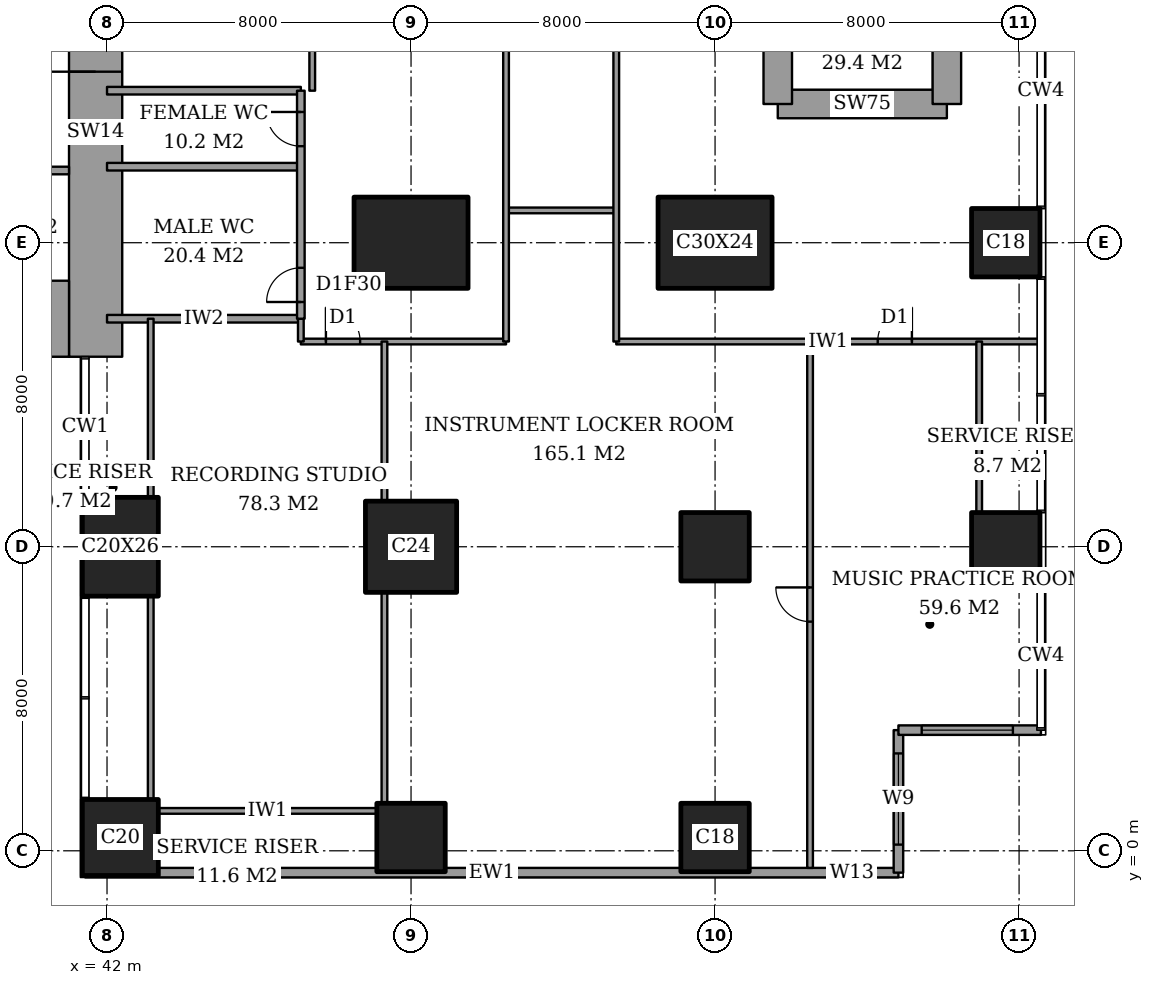
"""IFC4 building model, lengths in metres.
Left out: names, types, materials, properties, quantities, classifications, styles, units other than length and angle.
Written with IfcOpenShell. Run it as: python <this file> out.ifc"""

import sys

from ifc_helpers import new_model, si_unit, direction, frame, frame_2d, origin, origin_2d, place, context, subcontext, project, spatial, rectangle, extrude, element, fill, save


model = new_model("IFC4")
c1 = context("Model", 3, precision=1e-05, world=origin(), true_north=direction((0.0, 1.0)))
c2 = subcontext(c1, "Body", "Model", "MODEL_VIEW")
j1 = project(units=[si_unit("LENGTHUNIT", "METRE"), si_unit("PLANEANGLEUNIT", "RADIAN")], contexts=[c1])
p1 = place(None, origin())
s1 = spatial("IfcSite", under=j1, at=p1, CompositionType="ELEMENT")
p2 = place(p1, origin())
s2 = spatial("IfcBuilding", under=s1, at=p2, CompositionType="ELEMENT")
p3 = place(p2, frame((0.0, 0.0, 200.2)))
s3 = spatial("IfcBuildingStorey", under=s2, at=p3, CompositionType="ELEMENT", Elevation=200.2)
p4 = place(p3, frame((42.35, 0.35, 0.0), z_axis=(0.0, 0.0, 1.0), x_axis=(1.0, 0.0, 0.0)))
e1 = element("IfcColumn", 1, at=p4, inside=s3, PredefinedType="COLUMN", context=c2, shape_type="SweptSolid", body=[
    extrude(rectangle(XDim=2.0, YDim=2.0, at=origin_2d()), origin(), (0.0, 0.0, 1.0), 3.6),
])
p5 = place(p3, frame((42.35, 8.0, 0.0), z_axis=(0.0, 0.0, 1.0), x_axis=(1.0, 0.0, 0.0)))
e2 = element("IfcColumn", 2, at=p5, inside=s3, PredefinedType="COLUMN", context=c2, shape_type="SweptSolid", body=[
    extrude(rectangle(XDim=2.0, YDim=2.6, at=origin_2d()), origin(), (0.0, 0.0, 1.0), 3.6),
])
p6 = place(p3, frame((50.0, 0.35, 0.0), z_axis=(0.0, 0.0, 1.0), x_axis=(1.0, 0.0, 0.0)))
e3 = element("IfcColumn", 3, at=p6, inside=s3, PredefinedType="COLUMN", context=c2, shape_type="SweptSolid", body=[
    extrude(rectangle(XDim=1.8, YDim=1.8, at=origin_2d()), origin(), (0.0, 0.0, 1.0), 3.6),
])
p7 = place(p3, frame((50.0, 8.0, 0.0), z_axis=(0.0, 0.0, 1.0), x_axis=(1.0, 0.0, 0.0)))
e4 = element("IfcColumn", 4, at=p7, inside=s3, PredefinedType="COLUMN", context=c2, shape_type="SweptSolid", body=[
    extrude(rectangle(XDim=2.4, YDim=2.4, at=origin_2d()), origin(), (0.0, 0.0, 1.0), 3.6),
])
p8 = place(p3, frame((50.0, 16.0, 0.0), z_axis=(0.0, 0.0, 1.0), x_axis=(1.0, 0.0, 0.0)))
e5 = element("IfcColumn", 5, at=p8, inside=s3, PredefinedType="COLUMN", context=c2, shape_type="SweptSolid", body=[
    extrude(rectangle(XDim=3.0, YDim=2.4, at=origin_2d()), origin(), (0.0, 0.0, 1.0), 3.6),
])
for number, where, z_axis, x_axis in (
    (6, (58.0, 0.35, 0.0), (0.0, 0.0, 1.0), (1.0, 0.0, 0.0)),
    (7, (58.0, 8.0, 0.0), (0.0, 0.0, 1.0), (1.0, 0.0, 0.0)),
):
    element("IfcColumn", number, at=place(p3, frame(where, z_axis=z_axis, x_axis=x_axis)), inside=s3, PredefinedType="COLUMN", context=c2, shape_type="SweptSolid", body=[
        extrude(rectangle(XDim=1.8, YDim=1.8, at=origin_2d()), origin(), (0.0, 0.0, 1.0), 3.6),
    ])
p9 = place(p3, frame((58.0, 16.0, 0.0), z_axis=(0.0, 0.0, 1.0), x_axis=(1.0, 0.0, 0.0)))
e8 = element("IfcColumn", 8, at=p9, inside=s3, PredefinedType="COLUMN", context=c2, shape_type="SweptSolid", body=[
    extrude(rectangle(XDim=3.0, YDim=2.4, at=origin_2d()), origin(), (0.0, 0.0, 1.0), 3.6),
])
for number, where, z_axis, x_axis in (
    (9, (65.65, 8.0, 0.0), (0.0, 0.0, 1.0), (1.0, 0.0, 0.0)),
    (10, (65.65, 16.0, 0.0), (0.0, 0.0, 1.0), (1.0, 0.0, 0.0)),
):
    element("IfcColumn", number, at=place(p3, frame(where, z_axis=z_axis, x_axis=x_axis)), inside=s3, PredefinedType="COLUMN", context=c2, shape_type="SweptSolid", body=[
        extrude(rectangle(XDim=1.8, YDim=1.8, at=origin_2d()), origin(), (0.0, 0.0, 1.0), 3.6),
    ])
p10 = place(p3, frame((37.85, 14.0, 0.0), z_axis=(0.0, 0.0, 1.0), x_axis=(1.0, 0.0, 0.0)))
e11 = element("IfcWall", 11, at=p10, inside=s3, PredefinedType="SHEAR", context=c2, shape_type="SweptSolid", body=[
    extrude(rectangle(XDim=3.15, YDim=2.0, at=frame_2d((1.575, 0.0))), origin(), (0.0, 0.0, 1.0), 3.6),
])
p11 = place(p3, frame((41.7, 13.0, 0.0), z_axis=(0.0, 0.0, 1.0), x_axis=(0.0, 1.0, 0.0)))
e12 = element("IfcWall", 12, at=p11, inside=s3, PredefinedType="SHEAR", context=c2, shape_type="SweptSolid", body=[
    extrude(rectangle(XDim=11.85, YDim=1.4, at=frame_2d((5.925, 0.0))), origin(), (0.0, 0.0, 1.0), 3.6),
])
p12 = place(p11, frame((7.5, 0.0, 0.0)))
e13 = element("IfcOpeningElement", 13, at=p12, cuts=e12, PredefinedType="OPENING", context=c2, shape_type="SweptSolid", body=[
    extrude(rectangle(XDim=1.8, YDim=2.4, at=frame_2d((0.9, 1.2))), frame((0.0, 0.71, 0.0), z_axis=(0.0, -1.0, 0.0), x_axis=(1.0, 0.0, 0.0)), (0.0, 0.0, 1.0), 1.42),
])
p13 = place(p3, frame((59.65, 19.65, 0.0), z_axis=(0.0, 0.0, 1.0), x_axis=(1.0, 0.0, 0.0)))
e14 = element("IfcWall", 14, at=p13, inside=s3, PredefinedType="SHEAR", context=c2, shape_type="SweptSolid", body=[
    extrude(rectangle(XDim=4.45, YDim=0.75, at=frame_2d((2.225, 0.0))), origin(), (0.0, 0.0, 1.0), 3.6),
])
for number, where, z_axis, x_axis in (
    (15, (64.1, 19.65, 0.0), (0.0, 0.0, 1.0), (0.0, 1.0, 0.0)),
    (16, (59.65, 28.35, 0.0), (0.0, 0.0, 1.0), (0.0, -1.0, 0.0)),
):
    element("IfcWall", number, at=place(p3, frame(where, z_axis=z_axis, x_axis=x_axis)), inside=s3, PredefinedType="SHEAR", context=c2, shape_type="SweptSolid", body=[
        extrude(rectangle(XDim=8.7, YDim=0.75, at=frame_2d((4.35, 0.0))), origin(), (0.0, 0.0, 1.0), 3.6),
    ])
p14 = place(p3, frame((41.425, -0.575, 0.0), z_axis=(0.0, 0.0, 1.0), x_axis=(1.0, 0.0, 0.0)))
e17 = element("IfcWall", 17, at=p14, inside=s3, PredefinedType="SOLIDWALL", context=c2, shape_type="SweptSolid", body=[
    extrude(rectangle(XDim=21.4, YDim=0.25, at=frame_2d((10.7, 0.0))), origin(), (0.0, 0.0, 1.0), 3.6),
])
p15 = place(p14, frame((19.575, 0.0, 0.2)))
e18 = element("IfcOpeningElement", 18, at=p15, cuts=e17, PredefinedType="OPENING", context=c2, shape_type="SweptSolid", body=[
    extrude(rectangle(XDim=1.2, YDim=2.4, at=frame_2d((0.6, 1.2))), frame((0.0, 0.135, 0.0), z_axis=(0.0, -1.0, 0.0), x_axis=(1.0, 0.0, 0.0)), (0.0, 0.0, 1.0), 0.27),
])
p16 = place(p3, frame((62.825, -0.575, 0.0), z_axis=(0.0, 0.0, 1.0), x_axis=(0.0, 1.0, 0.0)))
e19 = element("IfcWall", 19, at=p16, inside=s3, PredefinedType="SOLIDWALL", context=c2, shape_type="SweptSolid", body=[
    extrude(rectangle(XDim=3.75, YDim=0.25, at=frame_2d((1.875, 0.0))), origin(), (0.0, 0.0, 1.0), 3.6),
])
p17 = place(p16, frame((0.738, 0.0, 0.2)))
e20 = element("IfcOpeningElement", 20, at=p17, cuts=e19, PredefinedType="OPENING", context=c2, shape_type="SweptSolid", body=[
    extrude(rectangle(XDim=2.4, YDim=2.4, at=frame_2d((1.2, 1.2))), frame((0.0, 0.135, 0.0), z_axis=(0.0, -1.0, 0.0), x_axis=(1.0, 0.0, 0.0)), (0.0, 0.0, 1.0), 0.27),
])
p18 = place(p3, frame((62.825, 3.175, 0.0), z_axis=(0.0, 0.0, 1.0), x_axis=(1.0, 0.0, 0.0)))
e21 = element("IfcWall", 21, at=p18, inside=s3, PredefinedType="SOLIDWALL", context=c2, shape_type="SweptSolid", body=[
    extrude(rectangle(XDim=3.75, YDim=0.25, at=frame_2d((1.875, 0.0))), origin(), (0.0, 0.0, 1.0), 3.6),
])
p19 = place(p18, frame((0.613, 0.0, 0.2)))
e22 = element("IfcOpeningElement", 22, at=p19, cuts=e21, PredefinedType="OPENING", context=c2, shape_type="SweptSolid", body=[
    extrude(rectangle(XDim=2.4, YDim=2.4, at=frame_2d((1.2, 1.2))), frame((0.0, 0.135, 0.0), z_axis=(0.0, -1.0, 0.0), x_axis=(1.0, 0.0, 0.0)), (0.0, 0.0, 1.0), 0.27),
])
p20 = place(p3, frame((43.35, 1.05, 0.0), z_axis=(0.0, 0.0, 1.0), x_axis=(1.0, 0.0, 0.0)))
e23 = element("IfcWall", 23, at=p20, inside=s3, PredefinedType="PARTITIONING", context=c2, shape_type="SweptSolid", body=[
    extrude(rectangle(XDim=5.75, YDim=0.15, at=frame_2d((2.875, 0.0))), origin(), (0.0, 0.0, 1.0), 3.35),
])
p21 = place(p3, frame((47.1, 13.4, 0.0), z_axis=(0.0, 0.0, 1.0), x_axis=(1.0, 0.0, 0.0)))
e24 = element("IfcWall", 24, at=p21, inside=s3, PredefinedType="PARTITIONING", context=c2, shape_type="SweptSolid", body=[
    extrude(rectangle(XDim=5.4, YDim=0.15, at=frame_2d((2.7, 0.0))), origin(), (0.0, 0.0, 1.0), 3.35),
])
p22 = place(p21, frame((0.66, 0.0, 0.0)))
e25 = element("IfcOpeningElement", 25, at=p22, cuts=e24, PredefinedType="OPENING", context=c2, shape_type="SweptSolid", body=[
    extrude(rectangle(XDim=0.9, YDim=2.1, at=frame_2d((0.45, 1.05))), frame((0.0, 0.085, 0.0), z_axis=(0.0, -1.0, 0.0), x_axis=(1.0, 0.0, 0.0)), (0.0, 0.0, 1.0), 0.17),
])
p23 = place(p3, frame((55.4, 13.4, 0.0), z_axis=(0.0, 0.0, 1.0), x_axis=(1.0, 0.0, 0.0)))
e26 = element("IfcWall", 26, at=p23, inside=s3, PredefinedType="PARTITIONING", context=c2, shape_type="SweptSolid", body=[
    extrude(rectangle(XDim=11.161, YDim=0.15, at=frame_2d((5.581, 0.0))), origin(), (0.0, 0.0, 1.0), 3.35),
])
p24 = place(p23, frame((6.88, 0.0, 0.0)))
e27 = element("IfcOpeningElement", 27, at=p24, cuts=e26, PredefinedType="OPENING", context=c2, shape_type="SweptSolid", body=[
    extrude(rectangle(XDim=0.9, YDim=2.1, at=frame_2d((0.45, 1.05))), frame((0.0, 0.085, 0.0), z_axis=(0.0, -1.0, 0.0), x_axis=(1.0, 0.0, 0.0)), (0.0, 0.0, 1.0), 0.17),
])
p25 = place(p3, frame((42.0, 14.0, 0.0), z_axis=(0.0, 0.0, 1.0), x_axis=(1.0, 0.0, 0.0)))
e28 = element("IfcWall", 28, at=p25, inside=s3, PredefinedType="PARTITIONING", context=c2, shape_type="SweptSolid", body=[
    extrude(rectangle(XDim=5.1, YDim=0.2, at=frame_2d((2.55, 0.0))), origin(), (0.0, 0.0, 1.0), 3.35),
])
p26 = place(p3, frame((52.5, 16.85, 0.0), z_axis=(0.0, 0.0, 1.0), x_axis=(1.0, 0.0, 0.0)))
e29 = element("IfcWall", 29, at=p26, inside=s3, PredefinedType="PARTITIONING", context=c2, shape_type="SweptSolid", body=[
    extrude(rectangle(XDim=2.9, YDim=0.15, at=frame_2d((1.45, 0.0))), origin(), (0.0, 0.0, 1.0), 3.35),
])
for number, where, z_axis, x_axis in (
    (30, (42.0, 18.0, 0.0), (0.0, 0.0, 1.0), (1.0, 0.0, 0.0)),
    (31, (42.0, 20.0, 0.0), (0.0, 0.0, 1.0), (1.0, 0.0, 0.0)),
):
    element("IfcWall", number, at=place(p3, frame(where, z_axis=z_axis, x_axis=x_axis)), inside=s3, PredefinedType="PARTITIONING", context=c2, shape_type="SweptSolid", body=[
        extrude(rectangle(XDim=5.1, YDim=0.2, at=frame_2d((2.55, 0.0))), origin(), (0.0, 0.0, 1.0), 3.35),
    ])
p27 = place(p3, frame((43.15, 1.35, 0.0), z_axis=(0.0, 0.0, 1.0), x_axis=(0.0, 1.0, 0.0)))
e32 = element("IfcWall", 32, at=p27, inside=s3, PredefinedType="PARTITIONING", context=c2, shape_type="SweptSolid", body=[
    extrude(rectangle(XDim=5.35, YDim=0.15, at=frame_2d((2.675, 0.0))), origin(), (0.0, 0.0, 1.0), 3.35),
])
p28 = place(p3, frame((43.15, 9.3, 0.0), z_axis=(0.0, 0.0, 1.0), x_axis=(0.0, 1.0, 0.0)))
e33 = element("IfcWall", 33, at=p28, inside=s3, PredefinedType="PARTITIONING", context=c2, shape_type="SweptSolid", body=[
    extrude(rectangle(XDim=4.7, YDim=0.15, at=frame_2d((2.35, 0.0))), origin(), (0.0, 0.0, 1.0), 3.35),
])
p29 = place(p3, frame((47.1, 14.0, 0.0), z_axis=(0.0, 0.0, 1.0), x_axis=(0.0, 1.0, 0.0)))
e34 = element("IfcWall", 34, at=p29, inside=s3, PredefinedType="PARTITIONING", context=c2, shape_type="SweptSolid", body=[
    extrude(rectangle(XDim=6.0, YDim=0.2, at=frame_2d((3.0, 0.0))), origin(), (0.0, 0.0, 1.0), 3.35),
])
p30 = place(p29, frame((0.44, 0.0, 0.0)))
e35 = element("IfcOpeningElement", 35, at=p30, cuts=e34, PredefinedType="OPENING", context=c2, shape_type="SweptSolid", body=[
    extrude(rectangle(XDim=0.9, YDim=2.1, at=frame_2d((0.45, 1.05))), frame((0.0, 0.11, 0.0), z_axis=(0.0, -1.0, 0.0), x_axis=(1.0, 0.0, 0.0)), (0.0, 0.0, 1.0), 0.22),
])
p31 = place(p29, frame((4.54, 0.0, 0.0)))
e36 = element("IfcOpeningElement", 36, at=p31, cuts=e34, PredefinedType="OPENING", context=c2, shape_type="SweptSolid", body=[
    extrude(rectangle(XDim=0.9, YDim=2.1, at=frame_2d((0.45, 1.05))), frame((0.0, 0.11, 0.0), z_axis=(0.0, -1.0, 0.0), x_axis=(1.0, 0.0, 0.0)), (0.0, 0.0, 1.0), 0.22),
])
p32 = place(p3, frame((47.1, 13.4, 0.0), z_axis=(0.0, 0.0, 1.0), x_axis=(0.0, 1.0, 0.0)))
e37 = element("IfcWall", 37, at=p32, inside=s3, PredefinedType="PARTITIONING", context=c2, shape_type="SweptSolid", body=[
    extrude(rectangle(XDim=0.6, YDim=0.15, at=frame_2d((0.3, 0.0))), origin(), (0.0, 0.0, 1.0), 3.35),
])
p33 = place(p3, frame((47.4, 20.0, 0.0), z_axis=(0.0, 0.0, 1.0), x_axis=(0.0, 1.0, 0.0)))
e38 = element("IfcWall", 38, at=p33, inside=s3, PredefinedType="PARTITIONING", context=c2, shape_type="SweptSolid", body=[
    extrude(rectangle(XDim=8.0, YDim=0.15, at=frame_2d((4.0, 0.0))), origin(), (0.0, 0.0, 1.0), 3.35),
])
p34 = place(p33, frame((3.5, 0.0, 0.0)))
e39 = element("IfcOpeningElement", 39, at=p34, cuts=e38, PredefinedType="OPENING", context=c2, shape_type="SweptSolid", body=[
    extrude(rectangle(XDim=1.0, YDim=2.1, at=frame_2d((0.5, 1.05))), frame((0.0, 0.085, 0.0), z_axis=(0.0, -1.0, 0.0), x_axis=(1.0, 0.0, 0.0)), (0.0, 0.0, 1.0), 0.17),
])
p35 = place(p3, frame((49.3, 1.25, 0.0), z_axis=(0.0, 0.0, 1.0), x_axis=(0.0, 1.0, 0.0)))
e40 = element("IfcWall", 40, at=p35, inside=s3, PredefinedType="PARTITIONING", context=c2, shape_type="SweptSolid", body=[
    extrude(rectangle(XDim=5.55, YDim=0.15, at=frame_2d((2.775, 0.0))), origin(), (0.0, 0.0, 1.0), 3.35),
])
p36 = place(p3, frame((49.3, 9.2, 0.0), z_axis=(0.0, 0.0, 1.0), x_axis=(0.0, 1.0, 0.0)))
e41 = element("IfcWall", 41, at=p36, inside=s3, PredefinedType="PARTITIONING", context=c2, shape_type="SweptSolid", body=[
    extrude(rectangle(XDim=4.2, YDim=0.15, at=frame_2d((2.1, 0.0))), origin(), (0.0, 0.0, 1.0), 3.35),
])
p37 = place(p3, frame((52.5, 13.4, 0.0), z_axis=(0.0, 0.0, 1.0), x_axis=(0.0, 1.0, 0.0)))
e42 = element("IfcWall", 42, at=p37, inside=s3, PredefinedType="PARTITIONING", context=c2, shape_type="SweptSolid", body=[
    extrude(rectangle(XDim=21.2, YDim=0.15, at=frame_2d((10.6, 0.0))), origin(), (0.0, 0.0, 1.0), 3.35),
])
p38 = place(p37, frame((10.15, 0.0, 0.0)))
e43 = element("IfcOpeningElement", 43, at=p38, cuts=e42, PredefinedType="OPENING", context=c2, shape_type="SweptSolid", body=[
    extrude(rectangle(XDim=0.9, YDim=2.1, at=frame_2d((0.45, 1.05))), frame((0.0, 0.085, 0.0), z_axis=(0.0, -1.0, 0.0), x_axis=(1.0, 0.0, 0.0)), (0.0, 0.0, 1.0), 0.17),
])
p39 = place(p3, frame((55.4, 13.4, 0.0), z_axis=(0.0, 0.0, 1.0), x_axis=(0.0, 1.0, 0.0)))
e44 = element("IfcWall", 44, at=p39, inside=s3, PredefinedType="PARTITIONING", context=c2, shape_type="SweptSolid", body=[
    extrude(rectangle(XDim=21.2, YDim=0.15, at=frame_2d((10.6, 0.0))), origin(), (0.0, 0.0, 1.0), 3.35),
])
p40 = place(p39, frame((10.09, 0.0, 0.0)))
e45 = element("IfcOpeningElement", 45, at=p40, cuts=e44, PredefinedType="OPENING", context=c2, shape_type="SweptSolid", body=[
    extrude(rectangle(XDim=1.0, YDim=2.1, at=frame_2d((0.5, 1.05))), frame((0.0, 0.085, 0.0), z_axis=(0.0, -1.0, 0.0), x_axis=(1.0, 0.0, 0.0)), (0.0, 0.0, 1.0), 0.17),
])
p41 = place(p3, frame((60.5, -0.45, 0.0), z_axis=(0.0, 0.0, 1.0), x_axis=(0.0, 1.0, 0.0)))
e46 = element("IfcWall", 46, at=p41, inside=s3, PredefinedType="PARTITIONING", context=c2, shape_type="SweptSolid", body=[
    extrude(rectangle(XDim=13.85, YDim=0.15, at=frame_2d((6.925, 0.0))), origin(), (0.0, 0.0, 1.0), 3.35),
])
p42 = place(p41, frame((6.48, 0.0, 0.0)))
e47 = element("IfcOpeningElement", 47, at=p42, cuts=e46, PredefinedType="OPENING", context=c2, shape_type="SweptSolid", body=[
    extrude(rectangle(XDim=0.9, YDim=2.1, at=frame_2d((0.45, 1.05))), frame((0.0, 0.085, 0.0), z_axis=(0.0, -1.0, 0.0), x_axis=(1.0, 0.0, 0.0)), (0.0, 0.0, 1.0), 0.17),
])
p43 = place(p3, frame((64.95, 8.9, 0.0), z_axis=(0.0, 0.0, 1.0), x_axis=(0.0, 1.0, 0.0)))
e48 = element("IfcWall", 48, at=p43, inside=s3, PredefinedType="PARTITIONING", context=c2, shape_type="SweptSolid", body=[
    extrude(rectangle(XDim=4.5, YDim=0.15, at=frame_2d((2.25, 0.0))), origin(), (0.0, 0.0, 1.0), 3.35),
])
p44 = place(p3, frame((28.3, 17.9, 0.0), z_axis=(0.0, 0.0, 1.0), x_axis=(1.0, 0.0, 0.0)))
e49 = element("IfcWall", 49, at=p44, inside=s3, PredefinedType="PARTITIONING", context=c2, shape_type="SweptSolid", body=[
    extrude(rectangle(XDim=12.7, YDim=0.2, at=frame_2d((6.35, 0.0))), origin(), (0.0, 0.0, 1.0), 3.6),
])
p45 = place(p44, frame((1.05, 0.0, 0.0)))
e50 = element("IfcOpeningElement", 50, at=p45, cuts=e49, PredefinedType="OPENING", context=c2, shape_type="SweptSolid", body=[
    extrude(rectangle(XDim=0.9, YDim=2.1, at=frame_2d((0.45, 1.05))), frame((0.0, 0.11, 0.0), z_axis=(0.0, -1.0, 0.0), x_axis=(1.0, 0.0, 0.0)), (0.0, 0.0, 1.0), 0.22),
])
p46 = place(p44, frame((10.6, 0.0, 0.0)))
e51 = element("IfcOpeningElement", 51, at=p46, cuts=e49, PredefinedType="OPENING", context=c2, shape_type="SweptSolid", body=[
    extrude(rectangle(XDim=1.2, YDim=2.1, at=frame_2d((0.6, 1.05))), frame((0.0, 0.11, 0.0), z_axis=(0.0, -1.0, 0.0), x_axis=(1.0, 0.0, 0.0)), (0.0, 0.0, 1.0), 0.22),
])
p47 = place(p15, origin())
e52 = element("IfcWindow", 52, at=p47, inside=s3, PartitioningType="SINGLE_PANEL", PredefinedType="WINDOW", context=c2, shape_type="SweptSolid", body=[
    extrude(rectangle(XDim=1.2, YDim=2.4, at=frame_2d((0.6, 1.2))), frame((0.0, 0.03, 0.0), z_axis=(0.0, -1.0, 0.0), x_axis=(1.0, 0.0, 0.0)), (0.0, 0.0, 1.0), 0.06),
])
fill(e18, e52)
p48 = place(p17, origin())
e53 = element("IfcWindow", 53, at=p48, inside=s3, PartitioningType="SINGLE_PANEL", PredefinedType="WINDOW", context=c2, shape_type="SweptSolid", body=[
    extrude(rectangle(XDim=2.4, YDim=2.4, at=frame_2d((1.2, 1.2))), frame((0.0, 0.03, 0.0), z_axis=(0.0, -1.0, 0.0), x_axis=(1.0, 0.0, 0.0)), (0.0, 0.0, 1.0), 0.06),
])
fill(e20, e53)
p49 = place(p19, origin())
e54 = element("IfcWindow", 54, at=p49, inside=s3, PartitioningType="SINGLE_PANEL", PredefinedType="WINDOW", context=c2, shape_type="SweptSolid", body=[
    extrude(rectangle(XDim=2.4, YDim=2.4, at=frame_2d((1.2, 1.2))), frame((0.0, 0.03, 0.0), z_axis=(0.0, -1.0, 0.0), x_axis=(1.0, 0.0, 0.0)), (0.0, 0.0, 1.0), 0.06),
])
fill(e22, e54)
p50 = place(p30, origin())
e55 = element("IfcDoor", 55, at=p50, inside=s3, OperationType="SINGLE_SWING_RIGHT", PredefinedType="DOOR", context=c2, shape_type="SweptSolid", body=[
    extrude(rectangle(XDim=0.9, YDim=2.1, at=frame_2d((0.45, 1.05))), frame((0.0, 0.025, 0.0), z_axis=(0.0, -1.0, 0.0), x_axis=(1.0, 0.0, 0.0)), (0.0, 0.0, 1.0), 0.05),
])
fill(e35, e55)
p51 = place(p31, origin())
e56 = element("IfcDoor", 56, at=p51, inside=s3, OperationType="SINGLE_SWING_LEFT", PredefinedType="DOOR", context=c2, shape_type="SweptSolid", body=[
    extrude(rectangle(XDim=0.9, YDim=2.1, at=frame_2d((0.45, 1.05))), frame((0.0, 0.025, 0.0), z_axis=(0.0, -1.0, 0.0), x_axis=(1.0, 0.0, 0.0)), (0.0, 0.0, 1.0), 0.05),
])
fill(e36, e56)
p52 = place(p24, origin())
e57 = element("IfcDoor", 57, at=p52, inside=s3, OperationType="SINGLE_SWING_LEFT", PredefinedType="DOOR", context=c2, shape_type="SweptSolid", body=[
    extrude(rectangle(XDim=0.9, YDim=2.1, at=frame_2d((0.45, 1.05))), frame((0.0, 0.025, 0.0), z_axis=(0.0, -1.0, 0.0), x_axis=(1.0, 0.0, 0.0)), (0.0, 0.0, 1.0), 0.05),
])
fill(e27, e57)
p53 = place(p42, origin())
e58 = element("IfcDoor", 58, at=p53, inside=s3, OperationType="SINGLE_SWING_LEFT", PredefinedType="DOOR", context=c2, shape_type="SweptSolid", body=[
    extrude(rectangle(XDim=0.9, YDim=2.1, at=frame_2d((0.45, 1.05))), frame((0.0, 0.025, 0.0), z_axis=(0.0, -1.0, 0.0), x_axis=(1.0, 0.0, 0.0)), (0.0, 0.0, 1.0), 0.05),
])
fill(e47, e58)
p54 = place(p22, origin())
e59 = element("IfcDoor", 59, at=p54, inside=s3, OperationType="SINGLE_SWING_RIGHT", PredefinedType="DOOR", context=c2, shape_type="SweptSolid", body=[
    extrude(rectangle(XDim=0.9, YDim=2.1, at=frame_2d((0.45, 1.05))), frame((0.0, 0.025, 0.0), z_axis=(0.0, -1.0, 0.0), x_axis=(1.0, 0.0, 0.0)), (0.0, 0.0, 1.0), 0.05),
])
fill(e25, e59)
p55 = place(p12, origin())
e60 = element("IfcDoor", 60, at=p55, inside=s3, OperationType="DOUBLE_DOOR_DOUBLE_SWING", PredefinedType="DOOR", context=c2, shape_type="SweptSolid", body=[
    extrude(rectangle(XDim=1.8, YDim=2.4, at=frame_2d((0.9, 1.2))), frame((0.0, 0.025, 0.0), z_axis=(0.0, -1.0, 0.0), x_axis=(1.0, 0.0, 0.0)), (0.0, 0.0, 1.0), 0.05),
])
fill(e13, e60)
save(model, sys.argv[1])
